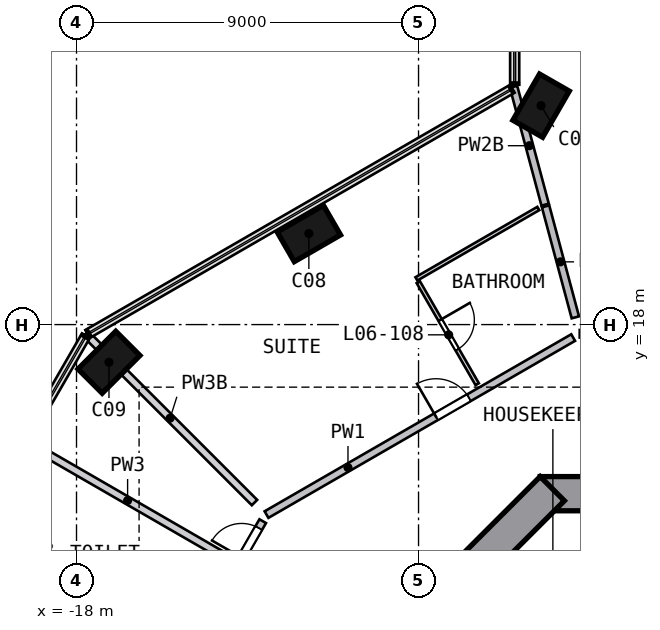
"""IFC4 building model, lengths in metres.
Left out: names, types, materials, properties, quantities, classifications, styles, units other than length and angle.
Written with IfcOpenShell. Run it as: python <this file> out.ifc"""

import sys

from ifc_helpers import new_model, si_unit, direction, frame, frame_2d, origin, origin_2d, place, context, subcontext, project, spatial, rectangle, extrude, element, fill, save


model = new_model("IFC4")
c1 = context("Model", 3, precision=1e-05, world=origin(), true_north=direction((0.0, 1.0)))
c2 = subcontext(c1, "Body", "Model", "MODEL_VIEW")
j1 = project(units=[si_unit("LENGTHUNIT", "METRE"), si_unit("PLANEANGLEUNIT", "RADIAN")], contexts=[c1])
p1 = place(None, origin())
s1 = spatial("IfcSite", under=j1, at=p1, CompositionType="ELEMENT")
p2 = place(p1, origin())
s2 = spatial("IfcBuilding", under=s1, at=p2, CompositionType="ELEMENT")
p3 = place(p2, frame((0.0, 0.0, 34.0)))
s3 = spatial("IfcBuildingStorey", under=s2, at=p3, CompositionType="ELEMENT", Elevation=34.0)
p4 = place(p3, frame((-5.68, 23.785, 0.0), z_axis=(-0.079276135, -0.019663387, 0.996658741), x_axis=(0.496015227, 0.866470496, 0.056548859)))
e1 = element("IfcColumn", 1, at=p4, inside=s3, PredefinedType="COLUMN", context=c2, shape_type="SweptSolid", body=[
    extrude(rectangle(XDim=1.4, YDim=0.9, at=origin_2d()), origin(), (0.0, 0.0, 1.0), 4.706),
])
p5 = place(p3, frame((-11.804, 20.445, 0.0), z_axis=(-0.067929504, -0.040010426, 0.99688753), x_axis=(-0.863199165, -0.498670621, -0.078834084)))
e2 = element("IfcColumn", 2, at=p5, inside=s3, PredefinedType="COLUMN", context=c2, shape_type="SweptSolid", body=[
    extrude(rectangle(XDim=1.4, YDim=0.9, at=origin_2d()), origin(), (0.0, 0.0, 1.0), 4.705),
])
p6 = place(p3, frame((-17.077, 17.077, 0.0), z_axis=(-0.056608184, -0.057490254, 0.996739878), x_axis=(0.705296544, 0.704306489, 0.08067934)))
e3 = element("IfcColumn", 3, at=p6, inside=s3, PredefinedType="COLUMN", context=c2, shape_type="SweptSolid", body=[
    extrude(rectangle(XDim=1.4, YDim=0.9, at=origin_2d()), origin(), (0.0, 0.0, 1.0), 4.705),
])
p7 = place(p3, frame((5.799, 13.55, 0.0), z_axis=(0.0, 0.0, 1.0), x_axis=(-1.0, 0.0, 0.0)))
e4 = element("IfcWall", 4, at=p7, inside=s3, PredefinedType="SHEAR", context=c2, shape_type="SweptSolid", body=[
    extrude(rectangle(XDim=11.598, YDim=0.9, at=frame_2d((5.799, 0.0))), origin(), (0.0, 0.0, 1.0), 5.0),
])
p8 = place(p7, frame((4.899, 0.0, 0.0)))
e5 = element("IfcOpeningElement", 5, at=p8, cuts=e4, PredefinedType="OPENING", context=c2, shape_type="SweptSolid", body=[
    extrude(rectangle(XDim=1.8, YDim=2.1, at=frame_2d((0.9, 1.05))), frame((0.0, 0.46, 0.0), z_axis=(0.0, -1.0, 0.0), x_axis=(1.0, 0.0, 0.0)), (0.0, 0.0, 1.0), 0.92),
])
p9 = place(p3, frame((-5.481, 13.682, 0.0), z_axis=(0.0, 0.0, 1.0), x_axis=(-0.707106781, -0.707106781, 0.0)))
e6 = element("IfcWall", 6, at=p9, inside=s3, PredefinedType="SHEAR", context=c2, shape_type="SweptSolid", body=[
    extrude(rectangle(XDim=11.598, YDim=0.9, at=frame_2d((5.799, 0.0))), origin(), (0.0, 0.0, 1.0), 5.0),
])
p10 = place(p3, frame((-17.658, 4.932, 0.0), z_axis=(0.0, 0.0, 1.0), x_axis=(0.49999291, 0.866029497, 0.0)))
e7 = element("IfcWall", 7, at=p10, inside=s3, PredefinedType="SOLIDWALL", context=c2, shape_type="SweptSolid", body=[
    extrude(rectangle(XDim=9.116, YDim=0.2, at=frame_2d((4.558, 0.0))), origin(), (0.0, 0.0, 1.0), 4.69),
])
p11 = place(p10, frame((0.2, 0.0, 0.0)))
e8 = element("IfcOpeningElement", 8, at=p11, cuts=e7, PredefinedType="OPENING", context=c2, shape_type="SweptSolid", body=[
    extrude(rectangle(XDim=1.0, YDim=2.1, at=frame_2d((0.5, 1.05))), frame((0.0, 0.11, 0.0), z_axis=(0.0, -1.0, 0.0), x_axis=(1.0, 0.0, 0.0)), (0.0, 0.0, 1.0), 0.22),
])
p12 = place(p10, frame((8.008, 0.0, 0.0)))
e9 = element("IfcOpeningElement", 9, at=p12, cuts=e7, PredefinedType="OPENING", context=c2, shape_type="SweptSolid", body=[
    extrude(rectangle(XDim=0.9, YDim=2.1, at=frame_2d((0.45, 1.05))), frame((0.0, 0.11, 0.0), z_axis=(0.0, -1.0, 0.0), x_axis=(1.0, 0.0, 0.0)), (0.0, 0.0, 1.0), 0.22),
])
p13 = place(p10, frame((5.708, 0.0, 0.0)))
e10 = element("IfcOpeningElement", 10, at=p13, cuts=e7, PredefinedType="OPENING", context=c2, shape_type="SweptSolid", body=[
    extrude(rectangle(XDim=0.9, YDim=2.1, at=frame_2d((0.45, 1.05))), frame((0.0, 0.11, 0.0), z_axis=(0.0, -1.0, 0.0), x_axis=(1.0, 0.0, 0.0)), (0.0, 0.0, 1.0), 0.22),
])
p14 = place(p3, frame((-13.0, 13.0, 0.0), z_axis=(0.0, 0.0, 1.0), x_axis=(0.866028487, 0.49999466, 0.0)))
e11 = element("IfcWall", 11, at=p14, inside=s3, PredefinedType="SOLIDWALL", context=c2, shape_type="SweptSolid", body=[
    extrude(rectangle(XDim=9.316, YDim=0.2, at=frame_2d((4.658, 0.0))), origin(), (0.0, 0.0, 1.0), 4.69),
])
p15 = place(p14, frame((5.15, 0.0, 0.0)))
e12 = element("IfcOpeningElement", 12, at=p15, cuts=e11, PredefinedType="OPENING", context=c2, shape_type="SweptSolid", body=[
    extrude(rectangle(XDim=1.0, YDim=2.1, at=frame_2d((0.5, 1.05))), frame((0.0, 0.11, 0.0), z_axis=(0.0, -1.0, 0.0), x_axis=(1.0, 0.0, 0.0)), (0.0, 0.0, 1.0), 0.22),
])
p16 = place(p3, frame((-5.669, 21.156, 0.0), z_axis=(0.0, 0.0, 1.0), x_axis=(-0.25885008, 0.96591751, 0.0)))
e13 = element("IfcWall", 13, at=p16, inside=s3, PredefinedType="SOLIDWALL", context=c2, shape_type="SweptSolid", body=[
    extrude(rectangle(XDim=3.211, YDim=0.2, at=frame_2d((1.606, 0.0))), origin(), (0.0, 0.0, 1.0), 4.19),
])
p17 = place(p3, frame((-4.874, 18.19, 0.0), z_axis=(0.0, 0.0, 1.0), x_axis=(-0.258853085, 0.965916705, 0.0)))
e14 = element("IfcWall", 14, at=p17, inside=s3, PredefinedType="SOLIDWALL", context=c2, shape_type="SweptSolid", body=[
    extrude(rectangle(XDim=3.025, YDim=0.2, at=frame_2d((1.512, 0.0))), origin(), (0.0, 0.0, 1.0), 4.69),
])
p18 = place(p3, frame((-9.006, 19.116, 0.0), z_axis=(0.0, 0.0, 1.0), x_axis=(0.499992859, -0.866029527, 0.0)))
e15 = element("IfcWall", 15, at=p18, inside=s3, PredefinedType="PARTITIONING", context=c2, shape_type="SweptSolid", body=[
    extrude(rectangle(XDim=3.1, YDim=0.1, at=frame_2d((1.55, 0.0))), origin(), (0.0, 0.0, 1.0), 4.69),
])
p19 = place(p18, frame((1.15, 0.0, 0.0)))
e16 = element("IfcOpeningElement", 16, at=p19, cuts=e15, PredefinedType="OPENING", context=c2, shape_type="SweptSolid", body=[
    extrude(rectangle(XDim=0.9, YDim=2.1, at=frame_2d((0.45, 1.05))), frame((0.0, 0.06, 0.0), z_axis=(0.0, -1.0, 0.0), x_axis=(1.0, 0.0, 0.0)), (0.0, 0.0, 1.0), 0.12),
])
p20 = place(p3, frame((-9.056, 19.203, 0.0), z_axis=(0.0, 0.0, 1.0), x_axis=(0.866048384, 0.499960194, 0.0)))
e17 = element("IfcWall", 17, at=p20, inside=s3, PredefinedType="PARTITIONING", context=c2, shape_type="SweptSolid", body=[
    extrude(rectangle(XDim=3.704, YDim=0.1, at=frame_2d((1.852, 0.0))), origin(), (0.0, 0.0, 1.0), 4.69),
])
p21 = place(p3, frame((-18.322, 10.578, 0.0), z_axis=(0.0, 0.0, 1.0), x_axis=(-0.86601126, 0.500024497, 0.0)))
e18 = element("IfcWall", 18, at=p21, inside=s3, PredefinedType="SOLIDWALL", context=c2, shape_type="SweptSolid", body=[
    extrude(rectangle(XDim=3.102, YDim=0.2, at=frame_2d((1.551, 0.0))), origin(), (0.0, 0.0, 1.0), 4.69),
])
p22 = place(p3, frame((-13.927, 11.794, 0.0), z_axis=(0.0, 0.0, 1.0), x_axis=(-0.866026184, 0.499998649, 0.0)))
e19 = element("IfcWall", 19, at=p22, inside=s3, PredefinedType="SOLIDWALL", context=c2, shape_type="SweptSolid", body=[
    extrude(rectangle(XDim=6.3, YDim=0.2, at=frame_2d((3.15, 0.0))), origin(), (0.0, 0.0, 1.0), 4.69),
])
p23 = place(p3, frame((-17.758, 17.758, 0.0), z_axis=(0.0, 0.0, 1.0), x_axis=(0.707106781, -0.707106781, 0.0)))
e20 = element("IfcWall", 20, at=p23, inside=s3, PredefinedType="SOLIDWALL", context=c2, shape_type="SweptSolid", body=[
    extrude(rectangle(XDim=6.282, YDim=0.2, at=frame_2d((3.141, 0.0))), origin(), (0.0, 0.0, 1.0), 4.19),
])
p24 = place(p15, origin())
e21 = element("IfcDoor", 21, at=p24, inside=s3, OperationType="SINGLE_SWING_LEFT", PredefinedType="DOOR", context=c2, shape_type="SweptSolid", body=[
    extrude(rectangle(XDim=1.0, YDim=2.1, at=frame_2d((0.5, 1.05))), frame((0.0, 0.025, 0.0), z_axis=(0.0, -1.0, 0.0), x_axis=(1.0, 0.0, 0.0)), (0.0, 0.0, 1.0), 0.05),
])
fill(e12, e21)
p25 = place(p19, origin())
e22 = element("IfcDoor", 22, at=p25, inside=s3, OperationType="SINGLE_SWING_LEFT", PredefinedType="DOOR", context=c2, shape_type="SweptSolid", body=[
    extrude(rectangle(XDim=0.9, YDim=2.1, at=frame_2d((0.45, 1.05))), frame((0.0, 0.025, 0.0), z_axis=(0.0, -1.0, 0.0), x_axis=(1.0, 0.0, 0.0)), (0.0, 0.0, 1.0), 0.05),
])
fill(e16, e22)
p26 = place(p12, origin())
e23 = element("IfcDoor", 23, at=p26, inside=s3, OperationType="SINGLE_SWING_LEFT", PredefinedType="DOOR", context=c2, shape_type="SweptSolid", body=[
    extrude(rectangle(XDim=0.9, YDim=2.1, at=frame_2d((0.45, 1.05))), frame((0.0, 0.025, 0.0), z_axis=(0.0, -1.0, 0.0), x_axis=(1.0, 0.0, 0.0)), (0.0, 0.0, 1.0), 0.05),
])
fill(e9, e23)
save(model, sys.argv[1])
